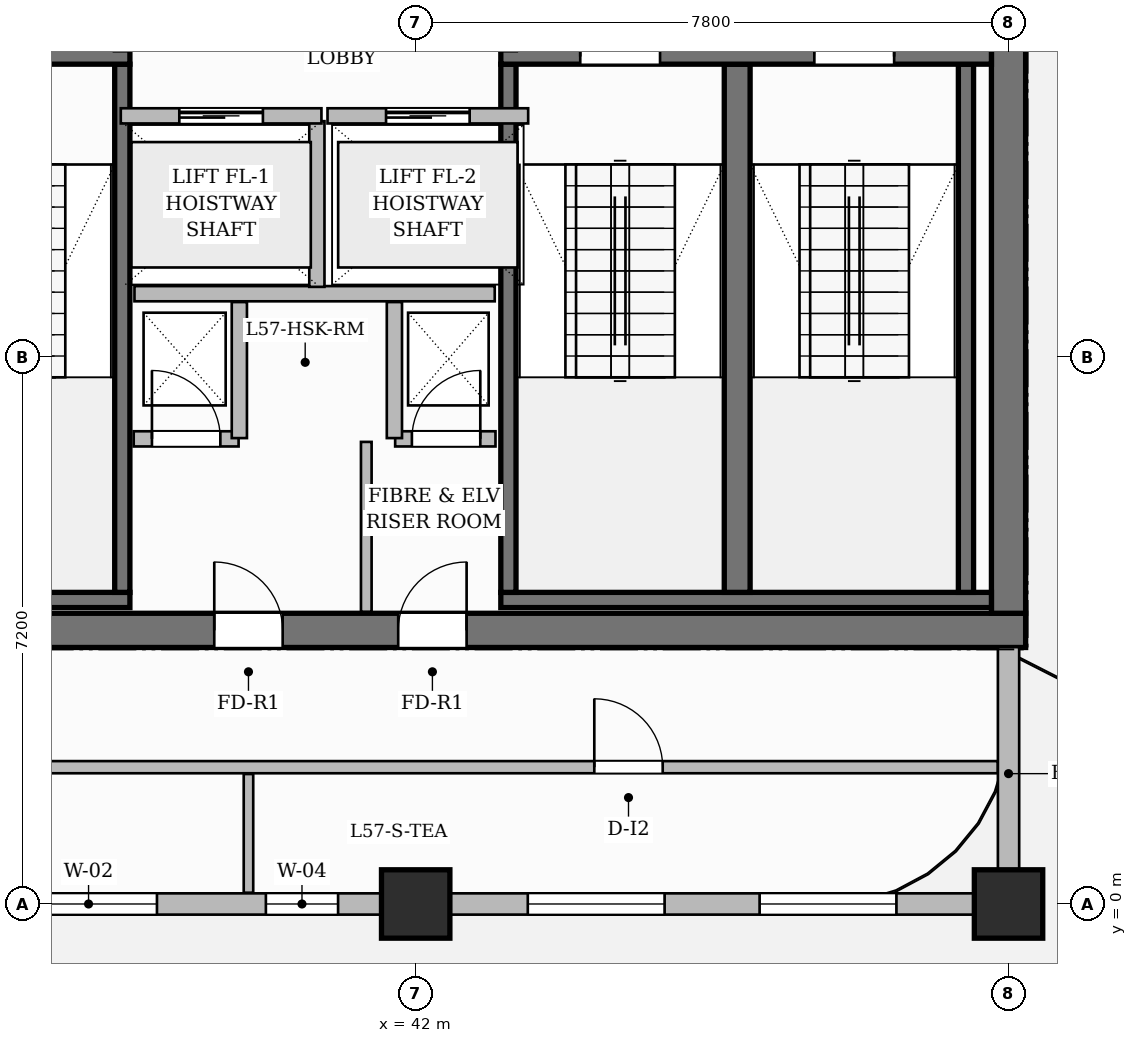
"""IFC4 building model, lengths in metres.
Left out: names, types, materials, properties, quantities, classifications, styles, units other than length and angle.
Written with IfcOpenShell. Run it as: python <this file> out.ifc"""

import sys

from ifc_helpers import new_model, si_unit, direction, frame, frame_2d, origin, origin_2d, place, context, subcontext, project, spatial, rectangle, extrude, source, transform, mapped, element, fill, save


model = new_model("IFC4")
c1 = context("Model", 3, precision=1e-05, world=origin(), true_north=direction((0.0, 1.0)))
c2 = subcontext(c1, "Body", "Model", "MODEL_VIEW")
j1 = project(units=[si_unit("LENGTHUNIT", "METRE"), si_unit("PLANEANGLEUNIT", "RADIAN")], contexts=[c1])
p1 = place(None, origin())
s1 = spatial("IfcSite", under=j1, at=p1, CompositionType="ELEMENT")
p2 = place(p1, origin())
s2 = spatial("IfcBuilding", under=s1, at=p2, CompositionType="ELEMENT")
p3 = place(p2, frame((0.0, 0.0, 228.85)))
s3 = spatial("IfcBuildingStorey", under=s2, at=p3, CompositionType="ELEMENT", Elevation=228.85)
p4 = place(p3, frame((34.575, 3.6, 0.0), z_axis=(0.0, 0.0, 1.0), x_axis=(1.0, 0.0, 0.0)))
e1 = element("IfcWall", 1, at=p4, inside=s3, PredefinedType="SHEAR", context=c2, shape_type="SweptSolid", body=[
    extrude(rectangle(XDim=15.45, YDim=0.45, at=frame_2d((7.725, 0.0))), origin(), (0.0, 0.0, 1.0), 3.85),
])
p5 = place(p4, frame((4.775, 0.0, 0.0)))
e2 = element("IfcOpeningElement", 2, at=p5, cuts=e1, PredefinedType="OPENING", context=c2, shape_type="SweptSolid", body=[
    extrude(rectangle(XDim=0.9, YDim=2.1, at=frame_2d((0.45, 1.05))), frame((0.0, 0.235, 0.0), z_axis=(0.0, -1.0, 0.0), x_axis=(1.0, 0.0, 0.0)), (0.0, 0.0, 1.0), 0.47),
])
p6 = place(p4, frame((7.195, 0.0, 0.0)))
e3 = element("IfcOpeningElement", 3, at=p6, cuts=e1, PredefinedType="OPENING", context=c2, shape_type="SweptSolid", body=[
    extrude(rectangle(XDim=0.9, YDim=2.1, at=frame_2d((0.45, 1.05))), frame((0.0, 0.235, 0.0), z_axis=(0.0, -1.0, 0.0), x_axis=(1.0, 0.0, 0.0)), (0.0, 0.0, 1.0), 0.47),
])
p7 = place(p3, frame((49.8, 3.825, 0.0), z_axis=(0.0, 0.0, 1.0), x_axis=(0.0, 1.0, 0.0)))
e4 = element("IfcWall", 4, at=p7, inside=s3, PredefinedType="SHEAR", context=c2, shape_type="SweptSolid", body=[
    extrude(rectangle(XDim=10.35, YDim=0.45, at=frame_2d((5.175, 0.0))), origin(), (0.0, 0.0, 1.0), 3.85),
])
m1 = source(origin(), c2, "Body", "SweptSolid", [
    extrude(rectangle(XDim=0.9, YDim=0.9, at=origin_2d()), origin(), (0.0, 0.0, 1.0), 3.85),
])
for number, where, z_axis, x_axis in (
    (5, (42.0, 0.0, 0.0), (0.0, 0.0, 1.0), (1.0, 0.0, 0.0)),
    (6, (49.8, 0.0, 0.0), (0.0, 0.0, 1.0), (1.0, 0.0, 0.0)),
):
    element("IfcColumn", number, at=place(p3, frame(where, z_axis=z_axis, x_axis=x_axis)), inside=s3, PredefinedType="COLUMN", context=c2, shape_type="MappedRepresentation", body=[
        mapped(m1, transform((0.0, 0.0, 0.0), scale=1.0)),
    ])
p8 = place(p3, frame((35.025, 4.0, 0.0), z_axis=(0.0, 0.0, 1.0), x_axis=(1.0, 0.0, 0.0)))
e7 = element("IfcWall", 7, at=p8, inside=s3, PredefinedType="SHEAR", context=c2, shape_type="SweptSolid", body=[
    extrude(rectangle(XDim=3.215, YDim=0.2, at=frame_2d((1.607, 0.0))), origin(), (0.0, 0.0, 1.0), 3.85),
])
p9 = place(p3, frame((38.14, 4.1, 0.0), z_axis=(0.0, 0.0, 1.0), x_axis=(0.0, 1.0, 0.0)))
e8 = element("IfcWall", 8, at=p9, inside=s3, PredefinedType="SHEAR", context=c2, shape_type="SweptSolid", body=[
    extrude(rectangle(XDim=6.95, YDim=0.2, at=frame_2d((3.475, 0.0))), origin(), (0.0, 0.0, 1.0), 3.85),
])
p10 = place(p3, frame((35.025, 11.15, 0.0), z_axis=(0.0, 0.0, 1.0), x_axis=(1.0, 0.0, 0.0)))
e9 = element("IfcWall", 9, at=p10, inside=s3, PredefinedType="SHEAR", context=c2, shape_type="SweptSolid", body=[
    extrude(rectangle(XDim=3.215, YDim=0.2, at=frame_2d((1.607, 0.0))), origin(), (0.0, 0.0, 1.0), 3.85),
])
p11 = place(p10, frame((1.12, 0.0, 0.0)))
e10 = element("IfcOpeningElement", 10, at=p11, cuts=e9, PredefinedType="OPENING", context=c2, shape_type="SweptSolid", body=[
    extrude(rectangle(XDim=1.05, YDim=2.2, at=frame_2d((0.525, 1.1))), frame((0.0, 0.11, 0.0), z_axis=(0.0, -1.0, 0.0), x_axis=(1.0, 0.0, 0.0)), (0.0, 0.0, 1.0), 0.22),
])
p12 = place(p3, frame((43.12, 4.0, 0.0), z_axis=(0.0, 0.0, 1.0), x_axis=(1.0, 0.0, 0.0)))
e11 = element("IfcWall", 11, at=p12, inside=s3, PredefinedType="SHEAR", context=c2, shape_type="SweptSolid", body=[
    extrude(rectangle(XDim=6.455, YDim=0.2, at=frame_2d((3.228, 0.0))), origin(), (0.0, 0.0, 1.0), 3.85),
])
p13 = place(p3, frame((43.22, 4.1, 0.0), z_axis=(0.0, 0.0, 1.0), x_axis=(0.0, 1.0, 0.0)))
e12 = element("IfcWall", 12, at=p13, inside=s3, PredefinedType="SHEAR", context=c2, shape_type="SweptSolid", body=[
    extrude(rectangle(XDim=6.95, YDim=0.2, at=frame_2d((3.475, 0.0))), origin(), (0.0, 0.0, 1.0), 3.85),
])
p14 = place(p3, frame((46.23, 4.1, 0.0), z_axis=(0.0, 0.0, 1.0), x_axis=(0.0, 1.0, 0.0)))
e13 = element("IfcWall", 13, at=p14, inside=s3, PredefinedType="SHEAR", context=c2, shape_type="SweptSolid", body=[
    extrude(rectangle(XDim=6.95, YDim=0.34, at=frame_2d((3.475, 0.0))), origin(), (0.0, 0.0, 1.0), 3.85),
])
p15 = place(p3, frame((49.24, 4.1, 0.0), z_axis=(0.0, 0.0, 1.0), x_axis=(0.0, 1.0, 0.0)))
e14 = element("IfcWall", 14, at=p15, inside=s3, PredefinedType="SHEAR", context=c2, shape_type="SweptSolid", body=[
    extrude(rectangle(XDim=6.95, YDim=0.2, at=frame_2d((3.475, 0.0))), origin(), (0.0, 0.0, 1.0), 3.85),
])
p16 = place(p3, frame((43.12, 11.15, 0.0), z_axis=(0.0, 0.0, 1.0), x_axis=(1.0, 0.0, 0.0)))
e15 = element("IfcWall", 15, at=p16, inside=s3, PredefinedType="SHEAR", context=c2, shape_type="SweptSolid", body=[
    extrude(rectangle(XDim=6.455, YDim=0.2, at=frame_2d((3.228, 0.0))), origin(), (0.0, 0.0, 1.0), 3.85),
])
p17 = place(p16, frame((1.045, 0.0, 0.0)))
e16 = element("IfcOpeningElement", 16, at=p17, cuts=e15, PredefinedType="OPENING", context=c2, shape_type="SweptSolid", body=[
    extrude(rectangle(XDim=1.05, YDim=2.2, at=frame_2d((0.525, 1.1))), frame((0.0, 0.11, 0.0), z_axis=(0.0, -1.0, 0.0), x_axis=(1.0, 0.0, 0.0)), (0.0, 0.0, 1.0), 0.22),
])
p18 = place(p16, frame((4.125, 0.0, 0.0)))
e17 = element("IfcOpeningElement", 17, at=p18, cuts=e15, PredefinedType="OPENING", context=c2, shape_type="SweptSolid", body=[
    extrude(rectangle(XDim=1.05, YDim=2.2, at=frame_2d((0.525, 1.1))), frame((0.0, 0.11, 0.0), z_axis=(0.0, -1.0, 0.0), x_axis=(1.0, 0.0, 0.0)), (0.0, 0.0, 1.0), 0.22),
])
p19 = place(p3, frame((38.3, 8.03, 0.0), z_axis=(0.0, 0.0, 1.0), x_axis=(1.0, 0.0, 0.0)))
e18 = element("IfcWall", 18, at=p19, inside=s3, PredefinedType="PARTITIONING", context=c2, shape_type="SweptSolid", body=[
    extrude(rectangle(XDim=4.74, YDim=0.2, at=frame_2d((2.37, 0.0))), origin(), (0.0, 0.0, 1.0), 3.6),
])
p20 = place(p3, frame((40.7, 8.12, 0.0), z_axis=(0.0, 0.0, 1.0), x_axis=(0.0, 1.0, 0.0)))
e19 = element("IfcWall", 19, at=p20, inside=s3, PredefinedType="PARTITIONING", context=c2, shape_type="SweptSolid", body=[
    extrude(rectangle(XDim=2.18, YDim=0.2, at=frame_2d((1.09, 0.0))), origin(), (0.0, 0.0, 1.0), 3.6),
])
p21 = place(p3, frame((38.29, 6.12, 0.0), z_axis=(0.0, 0.0, 1.0), x_axis=(1.0, 0.0, 0.0)))
e20 = element("IfcWall", 20, at=p21, inside=s3, PredefinedType="PARTITIONING", context=c2, shape_type="SweptSolid", body=[
    extrude(rectangle(XDim=1.38, YDim=0.2, at=frame_2d((0.69, 0.0))), origin(), (0.0, 0.0, 1.0), 3.6),
])
p22 = place(p21, frame((0.24, 0.0, 0.0)))
e21 = element("IfcOpeningElement", 21, at=p22, cuts=e20, PredefinedType="OPENING", context=c2, shape_type="SweptSolid", body=[
    extrude(rectangle(XDim=0.9, YDim=2.1, at=frame_2d((0.45, 1.05))), frame((0.0, 0.11, 0.0), z_axis=(0.0, -1.0, 0.0), x_axis=(1.0, 0.0, 0.0)), (0.0, 0.0, 1.0), 0.22),
])
p23 = place(p3, frame((39.68, 6.13, 0.0), z_axis=(0.0, 0.0, 1.0), x_axis=(0.0, 1.0, 0.0)))
e22 = element("IfcWall", 22, at=p23, inside=s3, PredefinedType="PARTITIONING", context=c2, shape_type="SweptSolid", body=[
    extrude(rectangle(XDim=1.79, YDim=0.2, at=frame_2d((0.895, 0.0))), origin(), (0.0, 0.0, 1.0), 3.6),
])
p24 = place(p3, frame((41.73, 6.12, 0.0), z_axis=(0.0, 0.0, 1.0), x_axis=(1.0, 0.0, 0.0)))
e23 = element("IfcWall", 23, at=p24, inside=s3, PredefinedType="PARTITIONING", context=c2, shape_type="SweptSolid", body=[
    extrude(rectangle(XDim=1.32, YDim=0.2, at=frame_2d((0.66, 0.0))), origin(), (0.0, 0.0, 1.0), 3.6),
])
p25 = place(p24, frame((0.22, 0.0, 0.0)))
e24 = element("IfcOpeningElement", 24, at=p25, cuts=e23, PredefinedType="OPENING", context=c2, shape_type="SweptSolid", body=[
    extrude(rectangle(XDim=0.9, YDim=2.1, at=frame_2d((0.45, 1.05))), frame((0.0, 0.11, 0.0), z_axis=(0.0, -1.0, 0.0), x_axis=(1.0, 0.0, 0.0)), (0.0, 0.0, 1.0), 0.22),
])
p26 = place(p3, frame((41.72, 6.13, 0.0), z_axis=(0.0, 0.0, 1.0), x_axis=(0.0, 1.0, 0.0)))
e25 = element("IfcWall", 25, at=p26, inside=s3, PredefinedType="PARTITIONING", context=c2, shape_type="SweptSolid", body=[
    extrude(rectangle(XDim=1.79, YDim=0.2, at=frame_2d((0.895, 0.0))), origin(), (0.0, 0.0, 1.0), 3.6),
])
p27 = place(p3, frame((41.35, 3.845, 0.0), z_axis=(0.0, 0.0, 1.0), x_axis=(0.0, 1.0, 0.0)))
e26 = element("IfcWall", 26, at=p27, inside=s3, PredefinedType="PARTITIONING", context=c2, shape_type="SweptSolid", body=[
    extrude(rectangle(XDim=2.235, YDim=0.14, at=frame_2d((1.118, 0.0))), origin(), (0.0, 0.0, 1.0), 3.6),
])
p28 = place(p3, frame((30.29, 1.8, 0.0), z_axis=(0.0, 0.0, 1.0), x_axis=(1.0, 0.0, 0.0)))
e27 = element("IfcWall", 27, at=p28, inside=s3, PredefinedType="PARTITIONING", context=c2, shape_type="SweptSolid", body=[
    extrude(rectangle(XDim=19.37, YDim=0.16, at=frame_2d((9.685, 0.0))), origin(), (0.0, 0.0, 1.0), 3.6),
])
p29 = place(p28, frame((5.074, 0.0, 0.0)))
e28 = element("IfcOpeningElement", 28, at=p29, cuts=e27, PredefinedType="OPENING", context=c2, shape_type="SweptSolid", body=[
    extrude(rectangle(XDim=0.9, YDim=2.15, at=frame_2d((0.45, 1.075))), frame((0.0, 0.09, 0.0), z_axis=(0.0, -1.0, 0.0), x_axis=(1.0, 0.0, 0.0)), (0.0, 0.0, 1.0), 0.18),
])
p30 = place(p28, frame((14.06, 0.0, 0.0)))
e29 = element("IfcOpeningElement", 29, at=p30, cuts=e27, PredefinedType="OPENING", context=c2, shape_type="SweptSolid", body=[
    extrude(rectangle(XDim=0.9, YDim=2.15, at=frame_2d((0.45, 1.075))), frame((0.0, 0.09, 0.0), z_axis=(0.0, -1.0, 0.0), x_axis=(1.0, 0.0, 0.0)), (0.0, 0.0, 1.0), 0.18),
])
p31 = place(p3, frame((39.8, 0.148, 0.0), z_axis=(0.0, 0.0, 1.0), x_axis=(0.0, 1.0, 0.0)))
e30 = element("IfcWall", 30, at=p31, inside=s3, PredefinedType="PARTITIONING", context=c2, shape_type="SweptSolid", body=[
    extrude(rectangle(XDim=1.562, YDim=0.125, at=frame_2d((0.781, 0.0))), origin(), (0.0, 0.0, 1.0), 3.6),
])
p32 = place(p3, frame((38.12, 10.37, 0.0), z_axis=(0.0, 0.0, 1.0), x_axis=(1.0, 0.0, 0.0)))
e31 = element("IfcWall", 31, at=p32, inside=s3, PredefinedType="PARTITIONING", context=c2, shape_type="SweptSolid", body=[
    extrude(rectangle(XDim=2.64, YDim=0.2, at=frame_2d((1.32, 0.0))), origin(), (0.0, 0.0, 1.0), 3.6),
])
p33 = place(p32, frame((0.77, 0.0, 0.0)))
e32 = element("IfcOpeningElement", 32, at=p33, cuts=e31, PredefinedType="OPENING", context=c2, shape_type="SweptSolid", body=[
    extrude(rectangle(XDim=1.1, YDim=2.2, at=frame_2d((0.55, 1.1))), frame((0.0, 0.11, 0.0), z_axis=(0.0, -1.0, 0.0), x_axis=(1.0, 0.0, 0.0)), (0.0, 0.0, 1.0), 0.22),
])
p34 = place(p3, frame((40.84, 10.37, 0.0), z_axis=(0.0, 0.0, 1.0), x_axis=(1.0, 0.0, 0.0)))
e33 = element("IfcWall", 33, at=p34, inside=s3, PredefinedType="PARTITIONING", context=c2, shape_type="SweptSolid", body=[
    extrude(rectangle(XDim=2.64, YDim=0.2, at=frame_2d((1.32, 0.0))), origin(), (0.0, 0.0, 1.0), 3.6),
])
p35 = place(p34, frame((0.77, 0.0, 0.0)))
e34 = element("IfcOpeningElement", 34, at=p35, cuts=e33, PredefinedType="OPENING", context=c2, shape_type="SweptSolid", body=[
    extrude(rectangle(XDim=1.1, YDim=2.2, at=frame_2d((0.55, 1.1))), frame((0.0, 0.11, 0.0), z_axis=(0.0, -1.0, 0.0), x_axis=(1.0, 0.0, 0.0)), (0.0, 0.0, 1.0), 0.22),
])
p36 = place(p3, frame((14.4, 0.0, 0.0), z_axis=(0.0, 0.0, 1.0), x_axis=(1.0, 0.0, 0.0)))
e35 = element("IfcWall", 35, at=p36, inside=s3, PredefinedType="SOLIDWALL", context=c2, shape_type="SweptSolid", body=[
    extrude(rectangle(XDim=35.4, YDim=0.28, at=frame_2d((17.7, 0.0))), origin(), (0.0, 0.0, 1.0), 3.135),
])
p37 = place(p36, frame((0.85, 0.0, 0.0)))
e36 = element("IfcOpeningElement", 36, at=p37, cuts=e35, PredefinedType="OPENING", context=c2, shape_type="SweptSolid", body=[
    extrude(rectangle(XDim=1.2, YDim=2.2, at=frame_2d((0.6, 1.1))), frame((0.0, 0.15, 0.0), z_axis=(0.0, -1.0, 0.0), x_axis=(1.0, 0.0, 0.0)), (0.0, 0.0, 1.0), 0.3),
])
p38 = place(p36, frame((2.596, 0.0, 0.8)))
e37 = element("IfcOpeningElement", 37, at=p38, cuts=e35, PredefinedType="OPENING", context=c2, shape_type="SweptSolid", body=[
    extrude(rectangle(XDim=0.95, YDim=1.75, at=frame_2d((0.475, 0.875))), frame((0.0, 0.15, 0.0), z_axis=(0.0, -1.0, 0.0), x_axis=(1.0, 0.0, 0.0)), (0.0, 0.0, 1.0), 0.3),
])
p39 = place(p36, frame((4.204, 0.0, 0.8)))
e38 = element("IfcOpeningElement", 38, at=p39, cuts=e35, PredefinedType="OPENING", context=c2, shape_type="SweptSolid", body=[
    extrude(rectangle(XDim=1.8, YDim=1.85, at=frame_2d((0.9, 0.925))), frame((0.0, 0.15, 0.0), z_axis=(0.0, -1.0, 0.0), x_axis=(1.0, 0.0, 0.0)), (0.0, 0.0, 1.0), 0.3),
])
p40 = place(p36, frame((9.415, 0.0, 0.8)))
e39 = element("IfcOpeningElement", 39, at=p40, cuts=e35, PredefinedType="OPENING", context=c2, shape_type="SweptSolid", body=[
    extrude(rectangle(XDim=1.8, YDim=1.85, at=frame_2d((0.9, 0.925))), frame((0.0, 0.15, 0.0), z_axis=(0.0, -1.0, 0.0), x_axis=(1.0, 0.0, 0.0)), (0.0, 0.0, 1.0), 0.3),
])
p41 = place(p36, frame((12.469, 0.0, 0.8)))
e40 = element("IfcOpeningElement", 40, at=p41, cuts=e35, PredefinedType="OPENING", context=c2, shape_type="SweptSolid", body=[
    extrude(rectangle(XDim=0.95, YDim=1.75, at=frame_2d((0.475, 0.875))), frame((0.0, 0.15, 0.0), z_axis=(0.0, -1.0, 0.0), x_axis=(1.0, 0.0, 0.0)), (0.0, 0.0, 1.0), 0.3),
])
p42 = place(p36, frame((16.804, 0.0, 0.8)))
e41 = element("IfcOpeningElement", 41, at=p42, cuts=e35, PredefinedType="OPENING", context=c2, shape_type="SweptSolid", body=[
    extrude(rectangle(XDim=1.8, YDim=1.85, at=frame_2d((0.9, 0.925))), frame((0.0, 0.15, 0.0), z_axis=(0.0, -1.0, 0.0), x_axis=(1.0, 0.0, 0.0)), (0.0, 0.0, 1.0), 0.3),
])
p43 = place(p36, frame((22.396, 0.0, 0.8)))
e42 = element("IfcOpeningElement", 42, at=p43, cuts=e35, PredefinedType="OPENING", context=c2, shape_type="SweptSolid", body=[
    extrude(rectangle(XDim=1.8, YDim=1.85, at=frame_2d((0.9, 0.925))), frame((0.0, 0.15, 0.0), z_axis=(0.0, -1.0, 0.0), x_axis=(1.0, 0.0, 0.0)), (0.0, 0.0, 1.0), 0.3),
])
p44 = place(p36, frame((25.629, 0.0, 0.8)))
e43 = element("IfcOpeningElement", 43, at=p44, cuts=e35, PredefinedType="OPENING", context=c2, shape_type="SweptSolid", body=[
    extrude(rectangle(XDim=0.95, YDim=1.75, at=frame_2d((0.475, 0.875))), frame((0.0, 0.15, 0.0), z_axis=(0.0, -1.0, 0.0), x_axis=(1.0, 0.0, 0.0)), (0.0, 0.0, 1.0), 0.3),
])
p45 = place(p36, frame((29.075, 0.0, 0.8)))
e44 = element("IfcOpeningElement", 44, at=p45, cuts=e35, PredefinedType="OPENING", context=c2, shape_type="SweptSolid", body=[
    extrude(rectangle(XDim=1.8, YDim=1.85, at=frame_2d((0.9, 0.925))), frame((0.0, 0.15, 0.0), z_axis=(0.0, -1.0, 0.0), x_axis=(1.0, 0.0, 0.0)), (0.0, 0.0, 1.0), 0.3),
])
p46 = place(p36, frame((32.125, 0.0, 0.8)))
e45 = element("IfcOpeningElement", 45, at=p46, cuts=e35, PredefinedType="OPENING", context=c2, shape_type="SweptSolid", body=[
    extrude(rectangle(XDim=1.8, YDim=1.85, at=frame_2d((0.9, 0.925))), frame((0.0, 0.15, 0.0), z_axis=(0.0, -1.0, 0.0), x_axis=(1.0, 0.0, 0.0)), (0.0, 0.0, 1.0), 0.3),
])
p47 = place(p3, frame((49.8, 0.05, 0.0), z_axis=(0.0, 0.0, 1.0), x_axis=(0.0, 1.0, 0.0)))
e46 = element("IfcWall", 46, at=p47, inside=s3, PredefinedType="SOLIDWALL", context=c2, shape_type="SweptSolid", body=[
    extrude(rectangle(XDim=3.33, YDim=0.28, at=frame_2d((1.665, 0.0))), origin(), (0.0, 0.0, 1.0), 3.6),
])
m2 = source(origin(), c2, "Body", "SweptSolid", [
    extrude(rectangle(XDim=1.05, YDim=2.2, at=frame_2d((0.525, 1.1))), frame((0.0, 0.025, 0.0), z_axis=(0.0, -1.0, 0.0), x_axis=(1.0, 0.0, 0.0)), (0.0, 0.0, 1.0), 0.05),
])
p48 = place(p17, origin())
e47 = element("IfcDoor", 47, at=p48, inside=s3, OperationType="SINGLE_SWING_LEFT", PredefinedType="DOOR", context=c2, shape_type="MappedRepresentation", body=[
    mapped(m2, transform((0.0, 0.0, 0.0), scale=1.0)),
])
fill(e16, e47)
p49 = place(p18, origin())
e48 = element("IfcDoor", 48, at=p49, inside=s3, OperationType="SINGLE_SWING_RIGHT", PredefinedType="DOOR", context=c2, shape_type="MappedRepresentation", body=[
    mapped(m2, transform((0.0, 0.0, 0.0), scale=1.0)),
])
fill(e17, e48)
m3 = source(origin(), c2, "Body", "SweptSolid", [
    extrude(rectangle(XDim=0.9, YDim=2.1, at=frame_2d((0.45, 1.05))), frame((0.0, 0.025, 0.0), z_axis=(0.0, -1.0, 0.0), x_axis=(1.0, 0.0, 0.0)), (0.0, 0.0, 1.0), 0.05),
])
p50 = place(p22, origin())
e49 = element("IfcDoor", 49, at=p50, inside=s3, OperationType="SINGLE_SWING_LEFT", PredefinedType="DOOR", context=c2, shape_type="MappedRepresentation", body=[
    mapped(m3, transform((0.0, 0.0, 0.0), scale=1.0)),
])
fill(e21, e49)
p51 = place(p25, origin())
e50 = element("IfcDoor", 50, at=p51, inside=s3, OperationType="SINGLE_SWING_RIGHT", PredefinedType="DOOR", context=c2, shape_type="MappedRepresentation", body=[
    mapped(m3, transform((0.0, 0.0, 0.0), scale=1.0)),
])
fill(e24, e50)
p52 = place(p5, origin())
e51 = element("IfcDoor", 51, at=p52, inside=s3, OperationType="SINGLE_SWING_LEFT", PredefinedType="DOOR", context=c2, shape_type="MappedRepresentation", body=[
    mapped(m3, transform((0.0, 0.0, 0.0), scale=1.0)),
])
fill(e2, e51)
p53 = place(p6, origin())
e52 = element("IfcDoor", 52, at=p53, inside=s3, OperationType="SINGLE_SWING_RIGHT", PredefinedType="DOOR", context=c2, shape_type="MappedRepresentation", body=[
    mapped(m3, transform((0.0, 0.0, 0.0), scale=1.0)),
])
fill(e3, e52)
m4 = source(origin(), c2, "Body", "SweptSolid", [
    extrude(rectangle(XDim=0.9, YDim=2.15, at=frame_2d((0.45, 1.075))), frame((0.0, 0.025, 0.0), z_axis=(0.0, -1.0, 0.0), x_axis=(1.0, 0.0, 0.0)), (0.0, 0.0, 1.0), 0.05),
])
p54 = place(p30, origin())
e53 = element("IfcDoor", 53, at=p54, inside=s3, OperationType="SINGLE_SWING_LEFT", PredefinedType="DOOR", context=c2, shape_type="MappedRepresentation", body=[
    mapped(m4, transform((0.0, 0.0, 0.0), scale=1.0)),
])
fill(e29, e53)
m5 = source(origin(), c2, "Body", "SweptSolid", [
    extrude(rectangle(XDim=1.1, YDim=2.2, at=frame_2d((0.55, 1.1))), frame((0.0, 0.025, 0.0), z_axis=(0.0, -1.0, 0.0), x_axis=(1.0, 0.0, 0.0)), (0.0, 0.0, 1.0), 0.05),
])
p55 = place(p33, origin())
e54 = element("IfcDoor", 54, at=p55, inside=s3, OperationType="SLIDING_TO_LEFT", PredefinedType="DOOR", context=c2, shape_type="MappedRepresentation", body=[
    mapped(m5, transform((0.0, 0.0, 0.0), scale=1.0)),
])
fill(e32, e54)
p56 = place(p35, origin())
e55 = element("IfcDoor", 55, at=p56, inside=s3, OperationType="SLIDING_TO_LEFT", PredefinedType="DOOR", context=c2, shape_type="MappedRepresentation", body=[
    mapped(m5, transform((0.0, 0.0, 0.0), scale=1.0)),
])
fill(e34, e55)
m6 = source(origin(), c2, "Body", "SweptSolid", [
    extrude(rectangle(XDim=1.8, YDim=1.85, at=frame_2d((0.9, 0.925))), frame((0.0, 0.03, 0.0), z_axis=(0.0, -1.0, 0.0), x_axis=(1.0, 0.0, 0.0)), (0.0, 0.0, 1.0), 0.06),
])
p57 = place(p43, origin())
e56 = element("IfcWindow", 56, at=p57, inside=s3, PartitioningType="DOUBLE_PANEL_VERTICAL", PredefinedType="WINDOW", context=c2, shape_type="MappedRepresentation", body=[
    mapped(m6, transform((0.0, 0.0, 0.0), scale=1.0)),
])
fill(e42, e56)
m7 = source(origin(), c2, "Body", "SweptSolid", [
    extrude(rectangle(XDim=0.95, YDim=1.75, at=frame_2d((0.475, 0.875))), frame((0.0, 0.03, 0.0), z_axis=(0.0, -1.0, 0.0), x_axis=(1.0, 0.0, 0.0)), (0.0, 0.0, 1.0), 0.06),
])
p58 = place(p44, origin())
e57 = element("IfcWindow", 57, at=p58, inside=s3, PartitioningType="SINGLE_PANEL", PredefinedType="WINDOW", context=c2, shape_type="MappedRepresentation", body=[
    mapped(m7, transform((0.0, 0.0, 0.0), scale=1.0)),
])
fill(e43, e57)
p59 = place(p45, origin())
e58 = element("IfcWindow", 58, at=p59, inside=s3, PartitioningType="DOUBLE_PANEL_VERTICAL", PredefinedType="WINDOW", context=c2, shape_type="MappedRepresentation", body=[
    mapped(m6, transform((0.0, 0.0, 0.0), scale=1.0)),
])
fill(e44, e58)
p60 = place(p46, origin())
e59 = element("IfcWindow", 59, at=p60, inside=s3, PartitioningType="DOUBLE_PANEL_VERTICAL", PredefinedType="WINDOW", context=c2, shape_type="MappedRepresentation", body=[
    mapped(m6, transform((0.0, 0.0, 0.0), scale=1.0)),
])
fill(e45, e59)
save(model, sys.argv[1])
